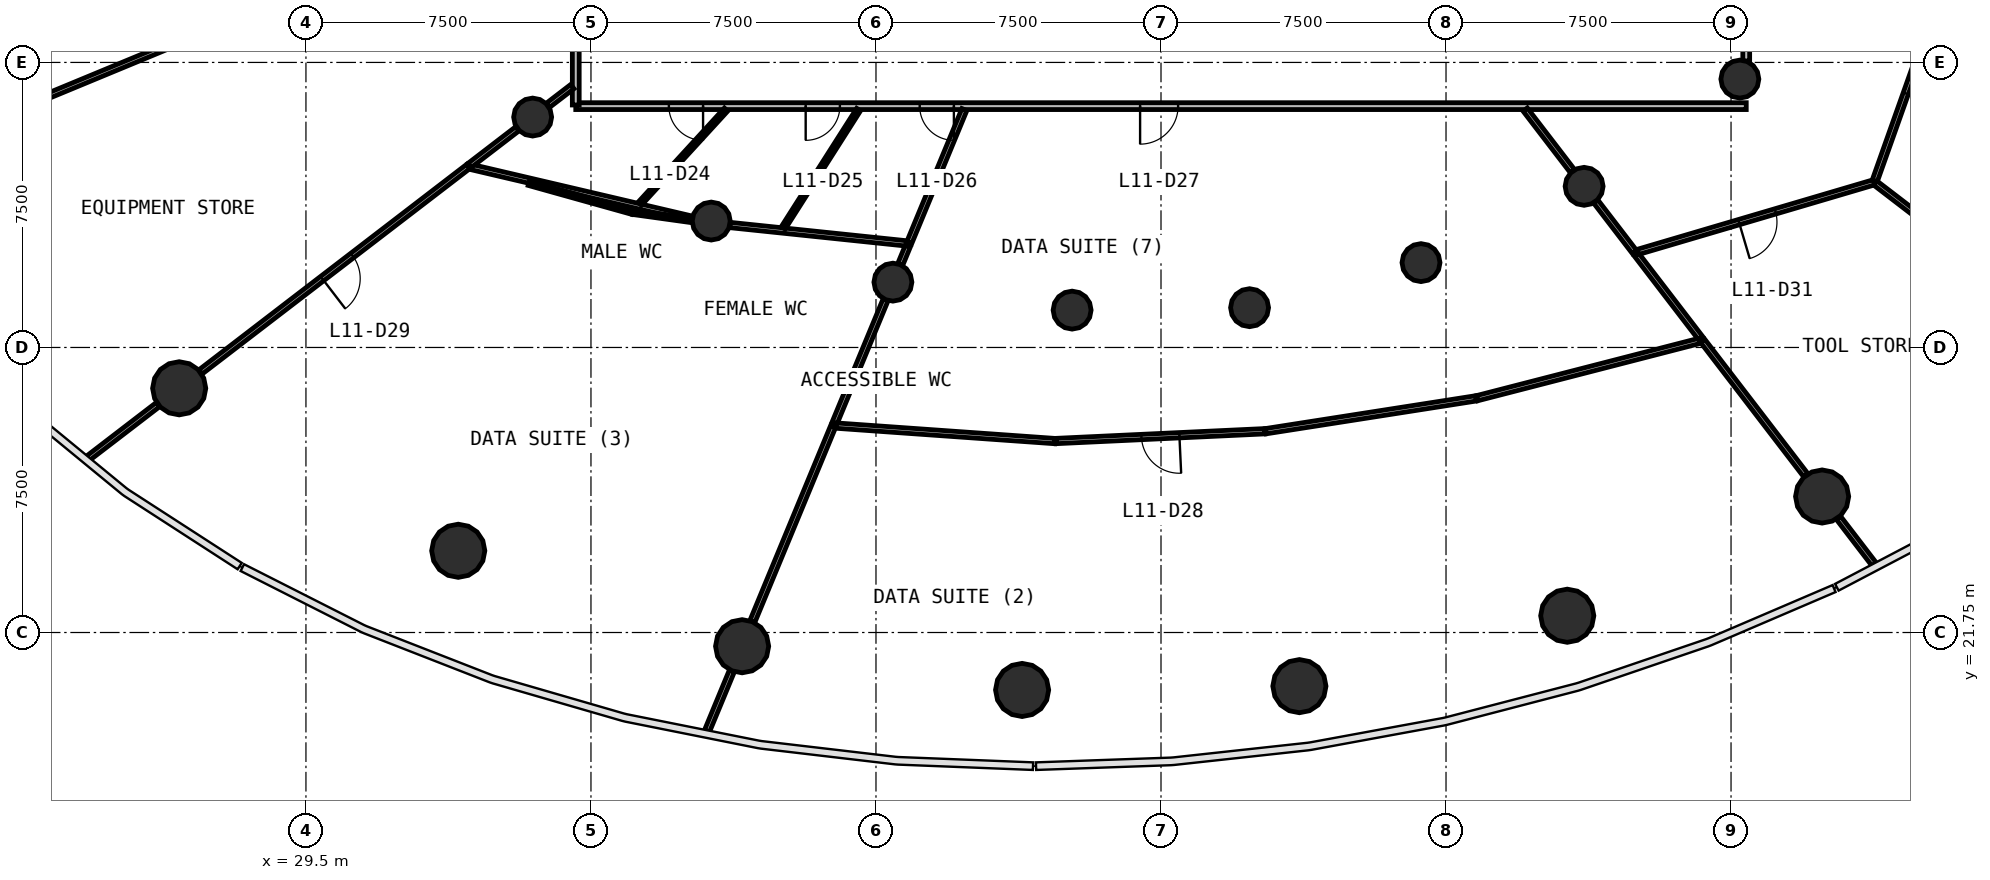
"""IFC4 building model, lengths in metres.
Left out: names, types, materials, properties, quantities, classifications, styles, units other than length and angle.
Written with IfcOpenShell. Run it as: python <this file> out.ifc"""

import sys

from ifc_helpers import new_model, si_unit, direction, frame, frame_2d, origin, origin_2d, place, context, subcontext, project, spatial, rectangle, circle, extrude, source, transform, mapped, element, fill, save


model = new_model("IFC4")
c1 = context("Model", 3, precision=1e-05, world=origin(), true_north=direction((0.0, 1.0)))
c2 = subcontext(c1, "Body", "Model", "MODEL_VIEW")
j1 = project(units=[si_unit("LENGTHUNIT", "METRE"), si_unit("PLANEANGLEUNIT", "RADIAN")], contexts=[c1])
p1 = place(None, origin())
s1 = spatial("IfcSite", under=j1, at=p1, CompositionType="ELEMENT")
p2 = place(p1, origin())
s2 = spatial("IfcBuilding", under=s1, at=p2, CompositionType="ELEMENT")
p3 = place(p2, frame((0.0, 0.0, 49.0)))
s3 = spatial("IfcBuildingStorey", under=s2, at=p3, CompositionType="ELEMENT", Elevation=49.0)
m1 = source(origin(), c2, "Body", "SweptSolid", [
    extrude(circle(Radius=0.7, at=origin_2d()), origin(), (0.0, 0.0, 1.0), 4.4),
])
for number, where, z_axis, x_axis in (
    (1, (26.164, 28.176, 0.0), (0.0, 0.0, 1.0), (1.0, 0.0, 0.0)),
    (2, (33.508, 23.9, 0.0), (0.0, 0.0, 1.0), (1.0, 0.0, 0.0)),
    (3, (40.977, 21.389, 0.0), (0.0, 0.0, 1.0), (1.0, 0.0, 0.0)),
    (4, (48.345, 20.239, 0.0), (0.0, 0.0, 1.0), (1.0, 0.0, 0.0)),
    (5, (55.642, 20.339, 0.0), (0.0, 0.0, 1.0), (1.0, 0.0, 0.0)),
    (6, (62.69, 22.191, 0.0), (0.0, 0.0, 1.0), (1.0, 0.0, 0.0)),
    (7, (69.396, 25.328, 0.0), (0.0, 0.0, 1.0), (1.0, 0.0, 0.0)),
):
    element("IfcColumn", number, at=place(p3, frame(where, z_axis=z_axis, x_axis=x_axis)), inside=s3, PredefinedType="COLUMN", context=c2, shape_type="MappedRepresentation", body=[
        mapped(m1, transform((0.0, 0.0, 0.0), scale=1.0)),
    ])
m2 = source(origin(), c2, "Body", "SweptSolid", [
    extrude(circle(Radius=0.5, at=origin_2d()), origin(), (0.0, 0.0, 1.0), 4.4),
])
for number, where, z_axis, x_axis in (
    (8, (35.465, 35.312, 0.0), (0.0, 0.0, 1.0), (1.0, 0.0, 0.0)),
    (9, (40.165, 32.576, 0.0), (0.0, 0.0, 1.0), (1.0, 0.0, 0.0)),
    (10, (44.945, 30.969, 0.0), (0.0, 0.0, 1.0), (1.0, 0.0, 0.0)),
    (11, (49.661, 30.233, 0.0), (0.0, 0.0, 1.0), (1.0, 0.0, 0.0)),
    (12, (54.331, 30.297, 0.0), (0.0, 0.0, 1.0), (1.0, 0.0, 0.0)),
    (13, (58.842, 31.482, 0.0), (0.0, 0.0, 1.0), (1.0, 0.0, 0.0)),
    (14, (63.134, 33.49, 0.0), (0.0, 0.0, 1.0), (1.0, 0.0, 0.0)),
    (15, (67.232, 36.312, 0.0), (0.0, 0.0, 1.0), (1.0, 0.0, 0.0)),
):
    element("IfcColumn", number, at=place(p3, frame(where, z_axis=z_axis, x_axis=x_axis)), inside=s3, PredefinedType="COLUMN", context=c2, shape_type="MappedRepresentation", body=[
        mapped(m2, transform((0.0, 0.0, 0.0), scale=1.0)),
    ])
p4 = place(p3, frame((67.4, 35.6, 0.0), z_axis=(0.0, 0.0, 1.0), x_axis=(-1.0, 0.0, 0.0)))
e16 = element("IfcWall", 16, at=p4, inside=s3, PredefinedType="PARTITIONING", context=c2, shape_type="SweptSolid", body=[
    extrude(rectangle(XDim=30.8, YDim=0.18, at=frame_2d((15.4, 0.0))), origin(), (0.0, 0.0, 1.0), 3.05),
])
p5 = place(p4, frame((27.45, 0.0, 0.0)))
e17 = element("IfcOpeningElement", 17, at=p5, cuts=e16, PredefinedType="OPENING", context=c2, shape_type="SweptSolid", body=[
    extrude(rectangle(XDim=0.9, YDim=2.1, at=frame_2d((0.45, 1.05))), frame((0.0, 0.1, 0.0), z_axis=(0.0, -1.0, 0.0), x_axis=(1.0, 0.0, 0.0)), (0.0, 0.0, 1.0), 0.2),
])
p6 = place(p4, frame((23.85, 0.0, 0.0)))
e18 = element("IfcOpeningElement", 18, at=p6, cuts=e16, PredefinedType="OPENING", context=c2, shape_type="SweptSolid", body=[
    extrude(rectangle(XDim=0.9, YDim=2.1, at=frame_2d((0.45, 1.05))), frame((0.0, 0.1, 0.0), z_axis=(0.0, -1.0, 0.0), x_axis=(1.0, 0.0, 0.0)), (0.0, 0.0, 1.0), 0.2),
])
p7 = place(p4, frame((20.85, 0.0, 0.0)))
e19 = element("IfcOpeningElement", 19, at=p7, cuts=e16, PredefinedType="OPENING", context=c2, shape_type="SweptSolid", body=[
    extrude(rectangle(XDim=0.9, YDim=2.1, at=frame_2d((0.45, 1.05))), frame((0.0, 0.1, 0.0), z_axis=(0.0, -1.0, 0.0), x_axis=(1.0, 0.0, 0.0)), (0.0, 0.0, 1.0), 0.2),
])
p8 = place(p4, frame((14.95, 0.0, 0.0)))
e20 = element("IfcOpeningElement", 20, at=p8, cuts=e16, PredefinedType="OPENING", context=c2, shape_type="SweptSolid", body=[
    extrude(rectangle(XDim=1.0, YDim=2.1, at=frame_2d((0.5, 1.05))), frame((0.0, 0.1, 0.0), z_axis=(0.0, -1.0, 0.0), x_axis=(1.0, 0.0, 0.0)), (0.0, 0.0, 1.0), 0.2),
])
p9 = place(p3, frame((67.4, 60.37, 0.0), z_axis=(0.0, 0.0, 1.0), x_axis=(0.0, -1.0, 0.0)))
e21 = element("IfcWall", 21, at=p9, inside=s3, PredefinedType="PARTITIONING", context=c2, shape_type="SweptSolid", body=[
    extrude(rectangle(XDim=23.583, YDim=0.18, at=frame_2d((11.791, 0.0))), origin(), (0.0, 0.0, 1.0), 3.05),
])
p10 = place(p9, frame((11.333, 0.0, 0.0)))
e22 = element("IfcOpeningElement", 22, at=p10, cuts=e21, PredefinedType="OPENING", context=c2, shape_type="SweptSolid", body=[
    extrude(rectangle(XDim=1.0, YDim=2.1, at=frame_2d((0.5, 1.05))), frame((0.0, 0.1, 0.0), z_axis=(0.0, -1.0, 0.0), x_axis=(1.0, 0.0, 0.0)), (0.0, 0.0, 1.0), 0.2),
])
p11 = place(p9, frame((9.133, 0.0, 0.0)))
e23 = element("IfcOpeningElement", 23, at=p11, cuts=e21, PredefinedType="OPENING", context=c2, shape_type="SweptSolid", body=[
    extrude(rectangle(XDim=1.0, YDim=2.1, at=frame_2d((0.5, 1.05))), frame((0.0, 0.1, 0.0), z_axis=(0.0, -1.0, 0.0), x_axis=(1.0, 0.0, 0.0)), (0.0, 0.0, 1.0), 0.2),
])
p12 = place(p3, frame((36.6, 35.63, 0.0), z_axis=(0.0, 0.0, 1.0), x_axis=(0.0, 1.0, 0.0)))
e24 = element("IfcWall", 24, at=p12, inside=s3, PredefinedType="PARTITIONING", context=c2, shape_type="SweptSolid", body=[
    extrude(rectangle(XDim=23.583, YDim=0.18, at=frame_2d((11.791, 0.0))), origin(), (0.0, 0.0, 1.0), 3.05),
])
p13 = place(p12, frame((11.333, 0.0, 0.0)))
e25 = element("IfcOpeningElement", 25, at=p13, cuts=e24, PredefinedType="OPENING", context=c2, shape_type="SweptSolid", body=[
    extrude(rectangle(XDim=1.0, YDim=2.1, at=frame_2d((0.5, 1.05))), frame((0.0, 0.1, 0.0), z_axis=(0.0, -1.0, 0.0), x_axis=(1.0, 0.0, 0.0)), (0.0, 0.0, 1.0), 0.2),
])
p14 = place(p12, frame((4.532, 0.0, 0.0)))
e26 = element("IfcOpeningElement", 26, at=p14, cuts=e24, PredefinedType="OPENING", context=c2, shape_type="SweptSolid", body=[
    extrude(rectangle(XDim=1.0, YDim=2.1, at=frame_2d((0.5, 1.05))), frame((0.0, 0.1, 0.0), z_axis=(0.0, -1.0, 0.0), x_axis=(1.0, 0.0, 0.0)), (0.0, 0.0, 1.0), 0.2),
])
p15 = place(p3, frame((33.776, 34.016, 0.0), z_axis=(0.0, 0.0, 1.0), x_axis=(-0.793363616038, -0.608748037161, 0.0)))
e27 = element("IfcWall", 27, at=p15, inside=s3, PredefinedType="PARTITIONING", context=c2, shape_type="SweptSolid", body=[
    extrude(rectangle(XDim=8.889, YDim=0.14, at=frame_2d((4.445, 0.0))), origin(), (0.0, 0.0, 1.0), 3.05),
])
p16 = place(p15, frame((3.85, 0.0, 0.0)))
e28 = element("IfcOpeningElement", 28, at=p16, cuts=e27, PredefinedType="OPENING", context=c2, shape_type="SweptSolid", body=[
    extrude(rectangle(XDim=1.0, YDim=2.1, at=frame_2d((0.5, 1.05))), frame((0.0, 0.08, 0.0), z_axis=(0.0, -1.0, 0.0), x_axis=(1.0, 0.0, 0.0)), (0.0, 0.0, 1.0), 0.16),
])
p17 = place(p3, frame((28.489, 38.261, 0.0), z_axis=(0.0, 0.0, 1.0), x_axis=(-0.923879491354, -0.382683531727, 0.0)))
e29 = element("IfcWall", 29, at=p17, inside=s3, PredefinedType="PARTITIONING", context=c2, shape_type="SweptSolid", body=[
    extrude(rectangle(XDim=8.753, YDim=0.14, at=frame_2d((4.376, 0.0))), origin(), (0.0, 0.0, 1.0), 3.05),
])
p18 = place(p3, frame((70.769, 33.598, 0.0), z_axis=(0.0, 0.0, 1.0), x_axis=(-0.959164410747, -0.282849134974, 0.0)))
e30 = element("IfcWall", 30, at=p18, inside=s3, PredefinedType="PARTITIONING", context=c2, shape_type="SweptSolid", body=[
    extrude(rectangle(XDim=6.562, YDim=0.14, at=frame_2d((3.281, 0.0))), origin(), (0.0, 0.0, 1.0), 3.05),
])
p19 = place(p18, frame((2.712, 0.0, 0.0)))
e31 = element("IfcOpeningElement", 31, at=p19, cuts=e30, PredefinedType="OPENING", context=c2, shape_type="SweptSolid", body=[
    extrude(rectangle(XDim=1.0, YDim=2.1, at=frame_2d((0.5, 1.05))), frame((0.0, 0.08, 0.0), z_axis=(0.0, -1.0, 0.0), x_axis=(1.0, 0.0, 0.0)), (0.0, 0.0, 1.0), 0.16),
])
p20 = place(p3, frame((72.798, 39.309, 0.0), z_axis=(0.0, 0.0, 1.0), x_axis=(-0.334820387554, -0.942281968456, 0.0)))
e32 = element("IfcWall", 32, at=p20, inside=s3, PredefinedType="PARTITIONING", context=c2, shape_type="SweptSolid", body=[
    extrude(rectangle(XDim=6.031, YDim=0.14, at=frame_2d((3.016, 0.0))), origin(), (0.0, 0.0, 1.0), 3.05),
])
p21 = place(p20, frame((2.581, 0.0, 0.0)))
e33 = element("IfcOpeningElement", 33, at=p21, cuts=e32, PredefinedType="OPENING", context=c2, shape_type="SweptSolid", body=[
    extrude(rectangle(XDim=1.0, YDim=2.1, at=frame_2d((0.5, 1.05))), frame((0.0, 0.08, 0.0), z_axis=(0.0, -1.0, 0.0), x_axis=(1.0, 0.0, 0.0)), (0.0, 0.0, 1.0), 0.16),
])
p22 = place(p3, frame((60.319, 27.916, 0.0), z_axis=(0.0, 0.0, 1.0), x_axis=(0.968340865999, 0.24963166313, 0.0)))
e34 = element("IfcWall", 34, at=p22, inside=s3, PredefinedType="PARTITIONING", context=c2, shape_type="SweptSolid", body=[
    extrude(rectangle(XDim=6.115, YDim=0.14, at=frame_2d((3.057, 0.0))), origin(), (0.0, 0.0, 1.0), 3.05),
])
p23 = place(p3, frame((33.805, 34.009, 0.0), z_axis=(0.0, 0.0, 1.0), x_axis=(0.973632222489, -0.22812342127, 0.0)))
e35 = element("IfcWall", 35, at=p23, inside=s3, PredefinedType="PARTITIONING", context=c2, shape_type="SweptSolid", body=[
    extrude(rectangle(XDim=6.018, YDim=0.14, at=frame_2d((3.009, 0.0))), origin(), (0.0, 0.0, 1.0), 3.05),
])
p24 = place(p3, frame((43.384, 27.199, 0.0), z_axis=(0.0, 0.0, 1.0), x_axis=(0.997508340925, -0.070548634182, 0.0)))
e36 = element("IfcWall", 36, at=p24, inside=s3, PredefinedType="PARTITIONING", context=c2, shape_type="SweptSolid", body=[
    extrude(rectangle(XDim=5.838, YDim=0.14, at=frame_2d((2.919, 0.0))), origin(), (0.0, 0.0, 1.0), 3.05),
])
p25 = place(p3, frame((70.793, 33.58, 0.0), z_axis=(0.0, 0.0, 1.0), x_axis=(0.793369467151, -0.6087404115, 0.0)))
e37 = element("IfcWall", 37, at=p25, inside=s3, PredefinedType="PARTITIONING", context=c2, shape_type="SweptSolid", body=[
    extrude(rectangle(XDim=5.608, YDim=0.14, at=frame_2d((2.804, 0.0))), origin(), (0.0, 0.0, 1.0), 3.05),
])
p26 = place(p3, frame((54.759, 27.047, 0.0), z_axis=(0.0, 0.0, 1.0), x_axis=(0.98802429514, 0.154298386943, 0.0)))
e38 = element("IfcWall", 38, at=p26, inside=s3, PredefinedType="PARTITIONING", context=c2, shape_type="SweptSolid", body=[
    extrude(rectangle(XDim=5.598, YDim=0.14, at=frame_2d((2.799, 0.0))), origin(), (0.0, 0.0, 1.0), 3.05),
])
p27 = place(p3, frame((43.373, 27.171, 0.0), z_axis=(0.0, 0.0, 1.0), x_axis=(-0.382670118501, -0.923885047182, 0.0)))
e39 = element("IfcWall", 39, at=p27, inside=s3, PredefinedType="PARTITIONING", context=c2, shape_type="SweptSolid", body=[
    extrude(rectangle(XDim=5.554, YDim=0.14, at=frame_2d((2.777, 0.0))), origin(), (0.0, 0.0, 1.0), 3.05),
])
p28 = place(p3, frame((54.729, 27.046, 0.0), z_axis=(0.0, 0.0, 1.0), x_axis=(-0.998905899041, -0.046765423781, 0.0)))
e40 = element("IfcWall", 40, at=p28, inside=s3, PredefinedType="PARTITIONING", context=c2, shape_type="SweptSolid", body=[
    extrude(rectangle(XDim=5.497, YDim=0.14, at=frame_2d((2.749, 0.0))), origin(), (0.0, 0.0, 1.0), 3.05),
])
p29 = place(p28, frame((2.247, 0.0, 0.0)))
e41 = element("IfcOpeningElement", 41, at=p29, cuts=e40, PredefinedType="OPENING", context=c2, shape_type="SweptSolid", body=[
    extrude(rectangle(XDim=1.0, YDim=2.1, at=frame_2d((0.5, 1.05))), frame((0.0, 0.08, 0.0), z_axis=(0.0, -1.0, 0.0), x_axis=(1.0, 0.0, 0.0)), (0.0, 0.0, 1.0), 0.16),
])
p30 = place(p3, frame((40.659, 32.472, 0.0), z_axis=(0.0, 0.0, 1.0), x_axis=(0.994613201527, -0.103656062762, 0.0)))
e42 = element("IfcWall", 42, at=p30, inside=s3, PredefinedType="PARTITIONING", context=c2, shape_type="SweptSolid", body=[
    extrude(rectangle(XDim=4.732, YDim=0.14, at=frame_2d((2.366, 0.0))), origin(), (0.0, 0.0, 1.0), 3.05),
])
p31 = place(p3, frame((66.258, 29.418, 0.0), z_axis=(0.0, 0.0, 1.0), x_axis=(0.608774632027, -0.793343209085, 0.0)))
e43 = element("IfcWall", 43, at=p31, inside=s3, PredefinedType="PARTITIONING", context=c2, shape_type="SweptSolid", body=[
    extrude(rectangle(XDim=4.451, YDim=0.14, at=frame_2d((2.226, 0.0))), origin(), (0.0, 0.0, 1.0), 3.05),
])
p32 = place(p3, frame((46.826, 35.51, 0.0), z_axis=(0.0, 0.0, 1.0), x_axis=(-0.382683759209, -0.923879397128, 0.0)))
e44 = element("IfcWall", 44, at=p32, inside=s3, PredefinedType="PARTITIONING", context=c2, shape_type="SweptSolid", body=[
    extrude(rectangle(XDim=3.789, YDim=0.14, at=frame_2d((1.895, 0.0))), origin(), (0.0, 0.0, 1.0), 3.05),
])
p33 = place(p3, frame((44.752, 30.502, 0.0), z_axis=(0.0, 0.0, 1.0), x_axis=(-0.382698672088, -0.923873219864, 0.0)))
e45 = element("IfcWall", 45, at=p33, inside=s3, PredefinedType="PARTITIONING", context=c2, shape_type="SweptSolid", body=[
    extrude(rectangle(XDim=3.502, YDim=0.14, at=frame_2d((1.751, 0.0))), origin(), (0.0, 0.0, 1.0), 3.05),
])
p34 = place(p3, frame((64.521, 31.683, 0.0), z_axis=(0.0, 0.0, 1.0), x_axis=(0.608761578312, -0.793353225727, 0.0)))
e46 = element("IfcWall", 46, at=p34, inside=s3, PredefinedType="PARTITIONING", context=c2, shape_type="SweptSolid", body=[
    extrude(rectangle(XDim=2.748, YDim=0.14, at=frame_2d((1.374, 0.0))), origin(), (0.0, 0.0, 1.0), 3.05),
])
p35 = place(p3, frame((25.606, 27.747, 0.0), z_axis=(0.0, 0.0, 1.0), x_axis=(-0.793384830347, -0.608720388172, 0.0)))
e47 = element("IfcWall", 47, at=p35, inside=s3, PredefinedType="PARTITIONING", context=c2, shape_type="SweptSolid", body=[
    extrude(rectangle(XDim=2.324, YDim=0.14, at=frame_2d((1.162, 0.0))), origin(), (0.0, 0.0, 1.0), 3.05),
])
p36 = place(p3, frame((61.584, 35.51, 0.0), z_axis=(0.0, 0.0, 1.0), x_axis=(0.608727763541, -0.793379171578, 0.0)))
e48 = element("IfcWall", 48, at=p36, inside=s3, PredefinedType="PARTITIONING", context=c2, shape_type="SweptSolid", body=[
    extrude(rectangle(XDim=2.042, YDim=0.14, at=frame_2d((1.021, 0.0))), origin(), (0.0, 0.0, 1.0), 3.05),
])
p37 = place(p3, frame((40.708, 20.737, 0.0), z_axis=(0.0, 0.0, 1.0), x_axis=(-0.382632674553, -0.923900555452, 0.0)))
e49 = element("IfcWall", 49, at=p37, inside=s3, PredefinedType="PARTITIONING", context=c2, shape_type="SweptSolid", body=[
    extrude(rectangle(XDim=1.714, YDim=0.14, at=frame_2d((0.857, 0.0))), origin(), (0.0, 0.0, 1.0), 3.05),
])
p38 = place(p3, frame((63.441, 33.09, 0.0), z_axis=(0.0, 0.0, 1.0), x_axis=(0.608812360851, -0.793314256317, 0.0)))
e50 = element("IfcWall", 50, at=p38, inside=s3, PredefinedType="PARTITIONING", context=c2, shape_type="SweptSolid", body=[
    extrude(rectangle(XDim=1.669, YDim=0.14, at=frame_2d((0.834, 0.0))), origin(), (0.0, 0.0, 1.0), 3.05),
])
p39 = place(p3, frame((35.065, 35.005, 0.0), z_axis=(0.0, 0.0, 1.0), x_axis=(-0.793286864057, -0.608848052732, 0.0)))
e51 = element("IfcWall", 51, at=p39, inside=s3, PredefinedType="PARTITIONING", context=c2, shape_type="SweptSolid", body=[
    extrude(rectangle(XDim=1.587, YDim=0.14, at=frame_2d((0.793, 0.0))), origin(), (0.0, 0.0, 1.0), 3.05),
])
p40 = place(p3, frame((69.825, 24.77, 0.0), z_axis=(0.0, 0.0, 1.0), x_axis=(0.608816471317, -0.793311101809, 0.0)))
e52 = element("IfcWall", 52, at=p40, inside=s3, PredefinedType="PARTITIONING", context=c2, shape_type="SweptSolid", body=[
    extrude(rectangle(XDim=1.544, YDim=0.14, at=frame_2d((0.772, 0.0))), origin(), (0.0, 0.0, 1.0), 3.05),
])
p41 = place(p3, frame((36.51, 36.114, 0.0), z_axis=(0.0, 0.0, 1.0), x_axis=(-0.793316076519, -0.608809989025, 0.0)))
e53 = element("IfcWall", 53, at=p41, inside=s3, PredefinedType="PARTITIONING", context=c2, shape_type="SweptSolid", body=[
    extrude(rectangle(XDim=0.812, YDim=0.14, at=frame_2d((0.406, 0.0))), origin(), (0.0, 0.0, 1.0), 3.05),
])
p42 = place(p3, frame((45.337, 31.914, 0.0), z_axis=(0.0, 0.0, 1.0), x_axis=(-0.382809221062, -0.923827419094, 0.0)))
e54 = element("IfcWall", 54, at=p42, inside=s3, PredefinedType="PARTITIONING", context=c2, shape_type="SweptSolid", body=[
    extrude(rectangle(XDim=0.519, YDim=0.14, at=frame_2d((0.259, 0.0))), origin(), (0.0, 0.0, 1.0), 3.05),
])
p43 = place(p3, frame((35.364, 33.572, 0.0), z_axis=(0.0, 0.0, 1.0), x_axis=(0.963049305084, -0.269325149172, 0.0)))
e55 = element("IfcWall", 55, at=p43, inside=s3, PredefinedType="PARTITIONING", context=c2, shape_type="SweptSolid", body=[
    extrude(rectangle(XDim=2.823, YDim=0.12, at=frame_2d((1.411, 0.0))), origin(), (0.0, 0.0, 1.0), 3.05),
])
p44 = place(p3, frame((44.043, 35.51, 0.0), z_axis=(0.0, 0.0, 1.0), x_axis=(-0.537273404115, -0.843408139177, 0.0)))
e56 = element("IfcWall", 56, at=p44, inside=s3, PredefinedType="PARTITIONING", context=c2, shape_type="SweptSolid", body=[
    extrude(rectangle(XDim=3.692, YDim=0.12, at=frame_2d((1.846, 0.0))), origin(), (0.0, 0.0, 1.0), 3.05),
])
p45 = place(p3, frame((40.555, 35.51, 0.0), z_axis=(0.0, 0.0, 1.0), x_axis=(-0.675566754316, -0.737298827114, 0.0)))
e57 = element("IfcWall", 57, at=p45, inside=s3, PredefinedType="PARTITIONING", context=c2, shape_type="SweptSolid", body=[
    extrude(rectangle(XDim=3.362, YDim=0.12, at=frame_2d((1.681, 0.0))), origin(), (0.0, 0.0, 1.0), 3.05),
])
p46 = place(p3, frame((38.112, 32.808, 0.0), z_axis=(0.0, 0.0, 1.0), x_axis=(0.990488726007, -0.137593908485, 0.0)))
e58 = element("IfcWall", 58, at=p46, inside=s3, PredefinedType="PARTITIONING", context=c2, shape_type="SweptSolid", body=[
    extrude(rectangle(XDim=1.563, YDim=0.12, at=frame_2d((0.782, 0.0))), origin(), (0.0, 0.0, 1.0), 3.05),
])
m3 = source(origin(), c2, "Body", "SweptSolid", [
    extrude(rectangle(XDim=0.9, YDim=2.1, at=frame_2d((0.45, 1.05))), frame((0.0, 0.025, 0.0), z_axis=(0.0, -1.0, 0.0), x_axis=(1.0, 0.0, 0.0)), (0.0, 0.0, 1.0), 0.05),
])
p47 = place(p5, origin())
e59 = element("IfcDoor", 59, at=p47, inside=s3, OperationType="SINGLE_SWING_LEFT", PredefinedType="DOOR", context=c2, shape_type="MappedRepresentation", body=[
    mapped(m3, transform((0.0, 0.0, 0.0), scale=1.0)),
])
fill(e17, e59)
p48 = place(p6, origin())
e60 = element("IfcDoor", 60, at=p48, inside=s3, OperationType="SINGLE_SWING_RIGHT", PredefinedType="DOOR", context=c2, shape_type="MappedRepresentation", body=[
    mapped(m3, transform((0.0, 0.0, 0.0), scale=1.0)),
])
fill(e18, e60)
p49 = place(p7, origin())
e61 = element("IfcDoor", 61, at=p49, inside=s3, OperationType="SINGLE_SWING_LEFT", PredefinedType="DOOR", context=c2, shape_type="MappedRepresentation", body=[
    mapped(m3, transform((0.0, 0.0, 0.0), scale=1.0)),
])
fill(e19, e61)
m4 = source(origin(), c2, "Body", "SweptSolid", [
    extrude(rectangle(XDim=1.0, YDim=2.1, at=frame_2d((0.5, 1.05))), frame((0.0, 0.025, 0.0), z_axis=(0.0, -1.0, 0.0), x_axis=(1.0, 0.0, 0.0)), (0.0, 0.0, 1.0), 0.05),
])
p50 = place(p8, origin())
e62 = element("IfcDoor", 62, at=p50, inside=s3, OperationType="SINGLE_SWING_RIGHT", PredefinedType="DOOR", context=c2, shape_type="MappedRepresentation", body=[
    mapped(m4, transform((0.0, 0.0, 0.0), scale=1.0)),
])
fill(e20, e62)
p51 = place(p29, origin())
e63 = element("IfcDoor", 63, at=p51, inside=s3, OperationType="SINGLE_SWING_LEFT", PredefinedType="DOOR", context=c2, shape_type="MappedRepresentation", body=[
    mapped(m4, transform((0.0, 0.0, 0.0), scale=1.0)),
])
fill(e41, e63)
p52 = place(p16, origin())
e64 = element("IfcDoor", 64, at=p52, inside=s3, OperationType="SINGLE_SWING_RIGHT", PredefinedType="DOOR", context=c2, shape_type="MappedRepresentation", body=[
    mapped(m4, transform((0.0, 0.0, 0.0), scale=1.0)),
])
fill(e28, e64)
p53 = place(p19, origin())
e65 = element("IfcDoor", 65, at=p53, inside=s3, OperationType="SINGLE_SWING_RIGHT", PredefinedType="DOOR", context=c2, shape_type="MappedRepresentation", body=[
    mapped(m4, transform((0.0, 0.0, 0.0), scale=1.0)),
])
fill(e31, e65)
p54 = place(p21, origin())
e66 = element("IfcDoor", 66, at=p54, inside=s3, OperationType="SINGLE_SWING_LEFT", PredefinedType="DOOR", context=c2, shape_type="MappedRepresentation", body=[
    mapped(m4, transform((0.0, 0.0, 0.0), scale=1.0)),
])
fill(e33, e66)
save(model, sys.argv[1])
